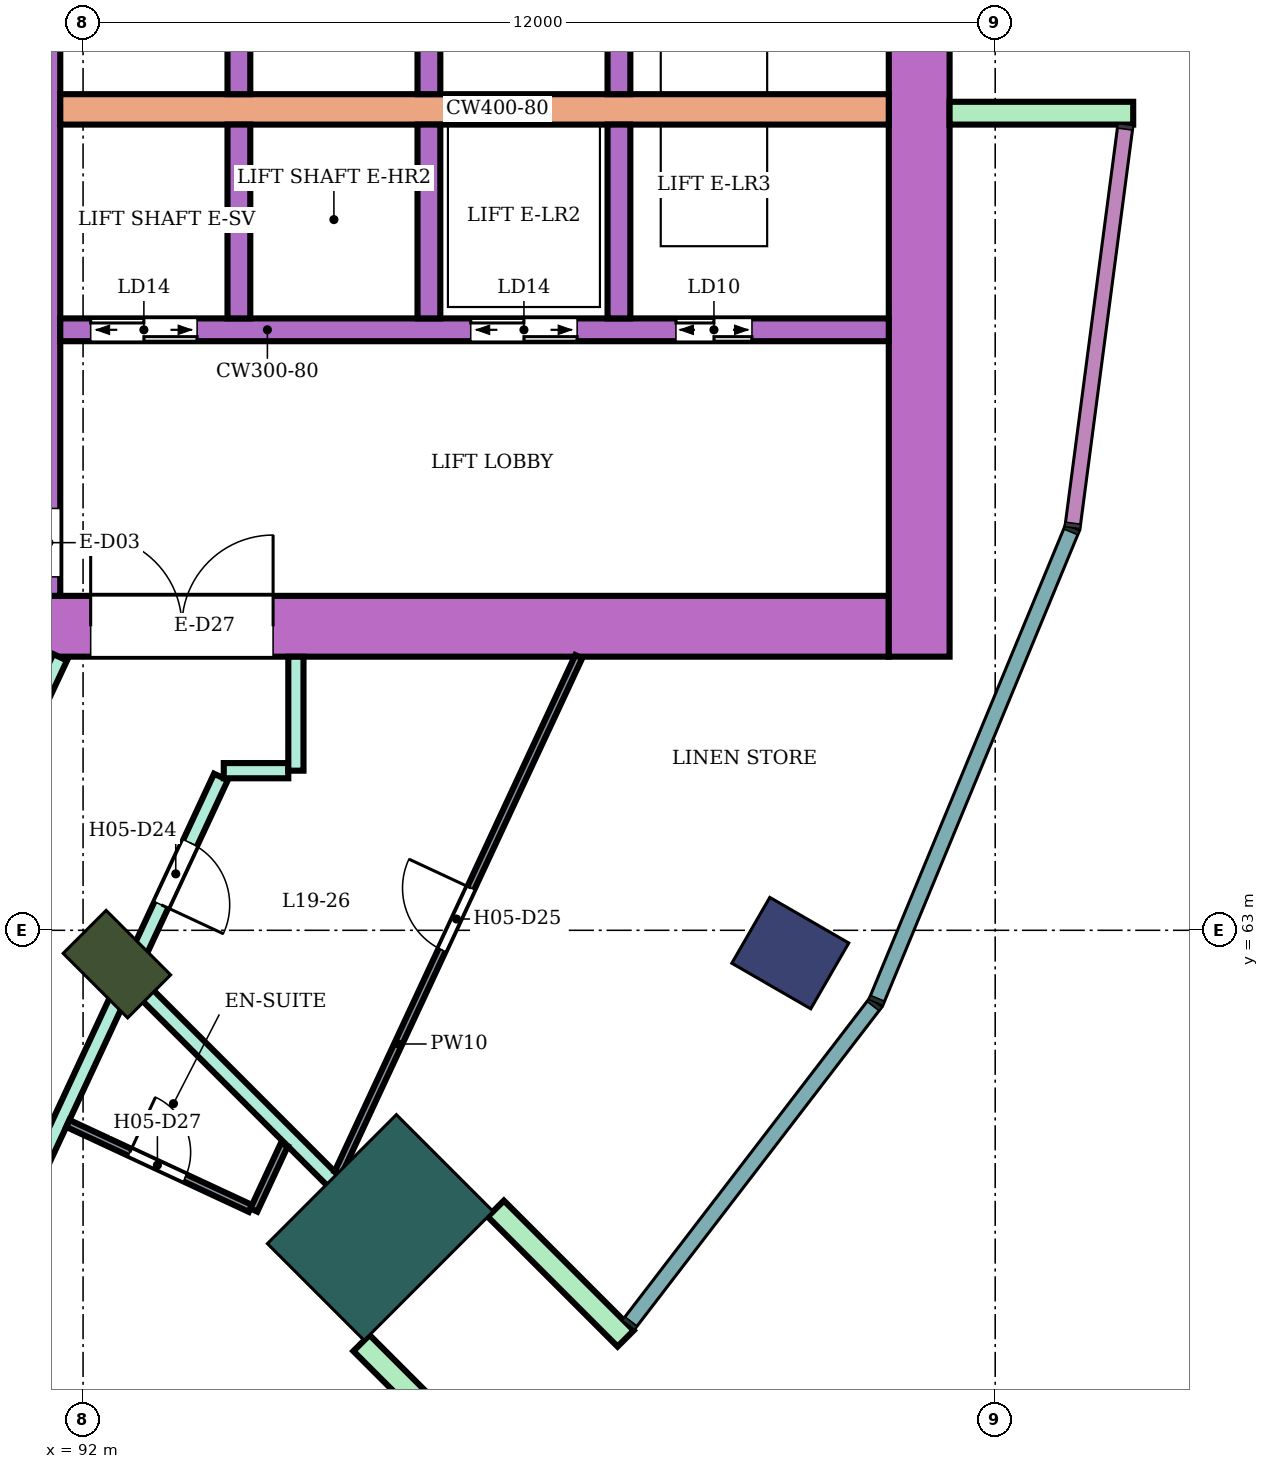
"""IFC4 building model, lengths in metres.
Left out: names, types, materials, properties, quantities, classifications, styles, units other than length and angle.
Written with IfcOpenShell. Run it as: python <this file> out.ifc"""

import sys

from ifc_helpers import new_model, si_unit, direction, frame, frame_2d, origin, origin_2d, place, context, subcontext, project, spatial, rectangle, extrude, element, fill, save


model = new_model("IFC4")
c1 = context("Model", 3, precision=1e-05, world=origin(), true_north=direction((0.0, 1.0)))
c2 = subcontext(c1, "Body", "Model", "MODEL_VIEW")
j1 = project(units=[si_unit("LENGTHUNIT", "METRE"), si_unit("PLANEANGLEUNIT", "RADIAN")], contexts=[c1])
p1 = place(None, origin())
s1 = spatial("IfcSite", under=j1, at=p1, CompositionType="ELEMENT")
p2 = place(p1, origin())
s2 = spatial("IfcBuilding", under=s1, at=p2, CompositionType="ELEMENT")
p3 = place(p2, frame((0.0, 0.0, 86.2)))
s3 = spatial("IfcBuildingStorey", under=s2, at=p3, CompositionType="ELEMENT", Elevation=86.2)
p4 = place(p3, frame((101.304, 62.7, 0.0), z_axis=(0.0, 0.0, 1.0), x_axis=(0.866025403784, -0.5, 0.0)))
e1 = element("IfcColumn", 1, at=p4, inside=s3, PredefinedType="COLUMN", context=c2, shape_type="SweptSolid", body=[
    extrude(rectangle(XDim=1.2, YDim=1.0, at=origin_2d()), origin(), (0.0, 0.0, 1.0), 3.8),
])
p5 = place(p3, frame((92.445, 62.555, 0.0), z_axis=(0.0, 0.0, 1.0), x_axis=(0.707106781187, -0.707106781187, 0.0)))
e2 = element("IfcColumn", 2, at=p5, inside=s3, PredefinedType="COLUMN", context=c2, shape_type="SweptSolid", body=[
    extrude(rectangle(XDim=1.2, YDim=0.8, at=origin_2d()), origin(), (0.0, 0.0, 1.0), 3.8),
])
p6 = place(p3, frame((95.91, 59.09, 0.0), z_axis=(0.0, 0.0, 1.0), x_axis=(0.707106781187, -0.707106781187, 0.0)))
e3 = element("IfcColumn", 3, at=p6, inside=s3, PredefinedType="COLUMN", context=c2, shape_type="SweptSolid", body=[
    extrude(rectangle(XDim=1.8, YDim=2.4, at=origin_2d()), origin(), (0.0, 0.0, 1.0), 3.8),
])
p7 = place(p3, frame((87.9, 67.0, 0.0), z_axis=(0.0, 0.0, 1.0), x_axis=(1.0, 0.0, 0.0)))
e4 = element("IfcWall", 4, at=p7, inside=s3, PredefinedType="SHEAR", context=c2, shape_type="SweptSolid", body=[
    extrude(rectangle(XDim=14.7, YDim=0.8, at=frame_2d((7.35, 0.0))), origin(), (0.0, 0.0, 1.0), 3.48),
])
p8 = place(p7, frame((4.2, 0.0, 0.0)))
e5 = element("IfcOpeningElement", 5, at=p8, cuts=e4, PredefinedType="OPENING", context=c2, shape_type="SweptSolid", body=[
    extrude(rectangle(XDim=2.4, YDim=2.4, at=frame_2d((1.2, 1.2))), frame((0.0, 0.41, 0.0), z_axis=(0.0, -1.0, 0.0), x_axis=(1.0, 0.0, 0.0)), (0.0, 0.0, 1.0), 0.82),
])
p9 = place(p3, frame((103.0, 66.6, 0.0), z_axis=(0.0, 0.0, 1.0), x_axis=(0.0, 1.0, 0.0)))
e6 = element("IfcWall", 6, at=p9, inside=s3, PredefinedType="SHEAR", context=c2, shape_type="SweptSolid", body=[
    extrude(rectangle(XDim=16.8, YDim=0.8, at=frame_2d((8.4, 0.0))), origin(), (0.0, 0.0, 1.0), 3.48),
])
p10 = place(p3, frame((91.55, 67.4, 0.0), z_axis=(0.0, 0.0, 1.0), x_axis=(0.0, 1.0, 0.0)))
e7 = element("IfcWall", 7, at=p10, inside=s3, PredefinedType="SHEAR", context=c2, shape_type="SweptSolid", body=[
    extrude(rectangle(XDim=7.6, YDim=0.3, at=frame_2d((3.8, 0.0))), origin(), (0.0, 0.0, 1.0), 3.48),
])
p11 = place(p10, frame((0.25, 0.0, 0.0)))
e8 = element("IfcOpeningElement", 8, at=p11, cuts=e7, PredefinedType="OPENING", context=c2, shape_type="SweptSolid", body=[
    extrude(rectangle(XDim=0.9, YDim=2.1, at=frame_2d((0.45, 1.05))), frame((0.0, 0.16, 0.0), z_axis=(0.0, -1.0, 0.0), x_axis=(1.0, 0.0, 0.0)), (0.0, 0.0, 1.0), 0.32),
])
p12 = place(p3, frame((91.7, 73.8, 0.0), z_axis=(0.0, 0.0, 1.0), x_axis=(1.0, 0.0, 0.0)))
e9 = element("IfcWall", 9, at=p12, inside=s3, PredefinedType="SHEAR", context=c2, shape_type="SweptSolid", body=[
    extrude(rectangle(XDim=10.9, YDim=0.4, at=frame_2d((5.45, 0.0))), origin(), (0.0, 0.0, 1.0), 3.48),
])
p13 = place(p3, frame((91.7, 70.9, 0.0), z_axis=(0.0, 0.0, 1.0), x_axis=(1.0, 0.0, 0.0)))
e10 = element("IfcWall", 10, at=p13, inside=s3, PredefinedType="SHEAR", context=c2, shape_type="SweptSolid", body=[
    extrude(rectangle(XDim=10.9, YDim=0.3, at=frame_2d((5.45, 0.0))), origin(), (0.0, 0.0, 1.0), 3.48),
])
p14 = place(p13, frame((0.4, 0.0, 0.0)))
e11 = element("IfcOpeningElement", 11, at=p14, cuts=e10, PredefinedType="OPENING", context=c2, shape_type="SweptSolid", body=[
    extrude(rectangle(XDim=1.4, YDim=2.1, at=frame_2d((0.7, 1.05))), frame((0.0, 0.16, 0.0), z_axis=(0.0, -1.0, 0.0), x_axis=(1.0, 0.0, 0.0)), (0.0, 0.0, 1.0), 0.32),
])
p15 = place(p13, frame((5.4, 0.0, 0.0)))
e12 = element("IfcOpeningElement", 12, at=p15, cuts=e10, PredefinedType="OPENING", context=c2, shape_type="SweptSolid", body=[
    extrude(rectangle(XDim=1.4, YDim=2.1, at=frame_2d((0.7, 1.05))), frame((0.0, 0.16, 0.0), z_axis=(0.0, -1.0, 0.0), x_axis=(1.0, 0.0, 0.0)), (0.0, 0.0, 1.0), 0.32),
])
p16 = place(p13, frame((8.1, 0.0, 0.0)))
e13 = element("IfcOpeningElement", 13, at=p16, cuts=e10, PredefinedType="OPENING", context=c2, shape_type="SweptSolid", body=[
    extrude(rectangle(XDim=1.0, YDim=2.1, at=frame_2d((0.5, 1.05))), frame((0.0, 0.16, 0.0), z_axis=(0.0, -1.0, 0.0), x_axis=(1.0, 0.0, 0.0)), (0.0, 0.0, 1.0), 0.32),
])
for number, where, z_axis, x_axis in (
    (14, (94.05, 74.0, 0.0), (0.0, 0.0, 1.0), (0.0, 1.0, 0.0)),
    (15, (96.55, 74.0, 0.0), (0.0, 0.0, 1.0), (0.0, 1.0, 0.0)),
    (16, (99.05, 74.0, 0.0), (0.0, 0.0, 1.0), (0.0, 1.0, 0.0)),
    (17, (94.05, 71.05, 0.0), (0.0, 0.0, 1.0), (0.0, 1.0, 0.0)),
    (18, (96.55, 71.05, 0.0), (0.0, 0.0, 1.0), (0.0, 1.0, 0.0)),
    (19, (99.05, 71.05, 0.0), (0.0, 0.0, 1.0), (0.0, 1.0, 0.0)),
):
    element("IfcWall", number, at=place(p3, frame(where, z_axis=z_axis, x_axis=x_axis)), inside=s3, PredefinedType="SHEAR", context=c2, shape_type="SweptSolid", body=[
        extrude(rectangle(XDim=2.55, YDim=0.3, at=frame_2d((1.275, 0.0))), origin(), (0.0, 0.0, 1.0), 3.48),
    ])
for number, where, z_axis, x_axis in (
    (20, (103.4, 73.75, 0.0), (0.0, 0.0, 1.0), (1.0, 0.0, 0.0)),
    (21, (95.662, 57.57, 0.0), (0.0, 0.0, 1.0), (0.707, -0.707, 0.0)),
    (22, (97.43, 59.338, 0.0), (0.0, 0.0, 1.0), (0.707, -0.707, 0.0)),
):
    element("IfcWall", number, at=place(p3, frame(where, z_axis=z_axis, x_axis=x_axis)), inside=s3, PredefinedType="NOTDEFINED", context=c2, shape_type="SweptSolid", body=[
        extrude(rectangle(XDim=2.416, YDim=0.3, at=frame_2d((1.208, 0.0))), origin(), (0.0, 0.0, 1.0), 3.8),
    ])
p17 = place(p3, frame((88.501, 59.775, 0.0), z_axis=(0.0, 0.0, 1.0), x_axis=(0.424700525505, 0.905333896215, 0.0)))
e23 = element("IfcWall", 23, at=p17, inside=s3, PredefinedType="PARTITIONING", context=c2, shape_type="SweptSolid", body=[
    extrude(rectangle(XDim=7.53, YDim=0.2, at=frame_2d((3.765, 0.0))), origin(), (0.0, 0.0, 1.0), 3.35),
])
p18 = place(p17, frame((5.83, 0.0, 0.0)))
e24 = element("IfcOpeningElement", 24, at=p18, cuts=e23, PredefinedType="OPENING", context=c2, shape_type="SweptSolid", body=[
    extrude(rectangle(XDim=1.0, YDim=2.1, at=frame_2d((0.5, 1.05))), frame((0.0, 0.11, 0.0), z_axis=(0.0, -1.0, 0.0), x_axis=(1.0, 0.0, 0.0)), (0.0, 0.0, 1.0), 0.22),
])
p19 = place(p3, frame((90.157, 57.394, 0.0), z_axis=(0.0, 0.0, 1.0), x_axis=(0.499815153866, -0.86613209845, 0.0)))
e25 = element("IfcWall", 25, at=p19, inside=s3, PredefinedType="PARTITIONING", context=c2, shape_type="SweptSolid", body=[
    extrude(rectangle(XDim=5.472, YDim=0.2, at=frame_2d((2.736, 0.0))), origin(), (0.0, 0.0, 1.0), 3.35),
])
p20 = place(p3, frame((90.346, 57.578, 0.0), z_axis=(0.0, 0.0, 1.0), x_axis=(0.422403412327, 0.906407941964, 0.0)))
e26 = element("IfcWall", 26, at=p20, inside=s3, PredefinedType="PARTITIONING", context=c2, shape_type="SweptSolid", body=[
    extrude(rectangle(XDim=8.208, YDim=0.2, at=frame_2d((4.104, 0.0))), origin(), (0.0, 0.0, 1.0), 3.35),
])
p21 = place(p20, frame((6.351, 0.0, 0.0)))
e27 = element("IfcOpeningElement", 27, at=p21, cuts=e26, PredefinedType="OPENING", context=c2, shape_type="SweptSolid", body=[
    extrude(rectangle(XDim=0.9, YDim=2.1, at=frame_2d((0.45, 1.05))), frame((0.0, 0.11, 0.0), z_axis=(0.0, -1.0, 0.0), x_axis=(1.0, 0.0, 0.0)), (0.0, 0.0, 1.0), 0.22),
])
p22 = place(p20, frame((0.55, 0.0, 0.0)))
e28 = element("IfcOpeningElement", 28, at=p22, cuts=e26, PredefinedType="OPENING", context=c2, shape_type="SweptSolid", body=[
    extrude(rectangle(XDim=1.0, YDim=2.1, at=frame_2d((0.5, 1.05))), frame((0.0, 0.11, 0.0), z_axis=(0.0, -1.0, 0.0), x_axis=(1.0, 0.0, 0.0)), (0.0, 0.0, 1.0), 0.22),
])
p23 = place(p3, frame((92.692, 62.303, 0.0), z_axis=(0.0, 0.0, 1.0), x_axis=(0.706920663731, -0.707292849667, 0.0)))
e29 = element("IfcWall", 29, at=p23, inside=s3, PredefinedType="PARTITIONING", context=c2, shape_type="SweptSolid", body=[
    extrude(rectangle(XDim=5.248, YDim=0.2, at=frame_2d((2.624, 0.0))), origin(), (0.0, 0.0, 1.0), 3.35),
])
p24 = place(p3, frame((93.851, 65.1, 0.0), z_axis=(0.0, 0.0, 1.0), x_axis=(1.0, 0.0, 0.0)))
e30 = element("IfcWall", 30, at=p24, inside=s3, PredefinedType="PARTITIONING", context=c2, shape_type="SweptSolid", body=[
    extrude(rectangle(XDim=0.849, YDim=0.2, at=frame_2d((0.424, 0.0))), origin(), (0.0, 0.0, 1.0), 3.35),
])
p25 = place(p3, frame((94.8, 65.1, 0.0), z_axis=(0.0, 0.0, 1.0), x_axis=(0.0, 1.0, 0.0)))
e31 = element("IfcWall", 31, at=p25, inside=s3, PredefinedType="PARTITIONING", context=c2, shape_type="SweptSolid", body=[
    extrude(rectangle(XDim=1.499, YDim=0.2, at=frame_2d((0.75, 0.0))), origin(), (0.0, 0.0, 1.0), 3.35),
])
p26 = place(p3, frame((91.8, 60.459, 0.0), z_axis=(0.0, 0.0, 1.0), x_axis=(0.906644059932, -0.421896371861, 0.0)))
e32 = element("IfcWall", 32, at=p26, inside=s3, PredefinedType="PARTITIONING", context=c2, shape_type="SweptSolid", body=[
    extrude(rectangle(XDim=2.649, YDim=0.1, at=frame_2d((1.325, 0.0))), origin(), (0.0, 0.0, 1.0), 3.35),
])
p27 = place(p26, frame((0.899, 0.0, 0.0)))
e33 = element("IfcOpeningElement", 33, at=p27, cuts=e32, PredefinedType="OPENING", context=c2, shape_type="SweptSolid", body=[
    extrude(rectangle(XDim=0.8, YDim=2.1, at=frame_2d((0.4, 1.05))), frame((0.0, 0.06, 0.0), z_axis=(0.0, -1.0, 0.0), x_axis=(1.0, 0.0, 0.0)), (0.0, 0.0, 1.0), 0.12),
])
p28 = place(p3, frame((94.247, 59.32, 0.0), z_axis=(0.0, 0.0, 1.0), x_axis=(0.422660124657, 0.906288264861, 0.0)))
e34 = element("IfcWall", 34, at=p28, inside=s3, PredefinedType="PARTITIONING", context=c2, shape_type="SweptSolid", body=[
    extrude(rectangle(XDim=0.949, YDim=0.1, at=frame_2d((0.475, 0.0))), origin(), (0.0, 0.0, 1.0), 3.35),
])
p29 = place(p3, frame((95.355, 59.806, 0.0), z_axis=(0.0, 0.0, 1.0), x_axis=(0.422407546544, 0.906406015328, 0.0)))
e35 = element("IfcWall", 35, at=p29, inside=s3, PredefinedType="PARTITIONING", context=c2, shape_type="SweptSolid", body=[
    extrude(rectangle(XDim=7.496, YDim=0.1, at=frame_2d((3.748, 0.0))), origin(), (0.0, 0.0, 1.0), 3.35),
])
p30 = place(p29, frame((3.238, 0.0, 0.0)))
e36 = element("IfcOpeningElement", 36, at=p30, cuts=e35, PredefinedType="OPENING", context=c2, shape_type="SweptSolid", body=[
    extrude(rectangle(XDim=0.9, YDim=2.1, at=frame_2d((0.45, 1.05))), frame((0.0, 0.06, 0.0), z_axis=(0.0, -1.0, 0.0), x_axis=(1.0, 0.0, 0.0)), (0.0, 0.0, 1.0), 0.12),
])
p31 = place(p21, frame((0.9, 0.0, 0.0), z_axis=(0.0, 0.0, 1.0), x_axis=(-1.0, 0.0, 0.0)))
e37 = element("IfcDoor", 37, at=p31, inside=s3, OperationType="SINGLE_SWING_RIGHT", PredefinedType="DOOR", context=c2, shape_type="SweptSolid", body=[
    extrude(rectangle(XDim=0.9, YDim=2.1, at=frame_2d((0.45, 1.05))), frame((0.0, 0.025, 0.0), z_axis=(0.0, -1.0, 0.0), x_axis=(1.0, 0.0, 0.0)), (0.0, 0.0, 1.0), 0.05),
])
fill(e27, e37)
p32 = place(p30, origin())
e38 = element("IfcDoor", 38, at=p32, inside=s3, OperationType="SINGLE_SWING_RIGHT", PredefinedType="DOOR", context=c2, shape_type="SweptSolid", body=[
    extrude(rectangle(XDim=0.9, YDim=2.1, at=frame_2d((0.45, 1.05))), frame((0.0, 0.025, 0.0), z_axis=(0.0, -1.0, 0.0), x_axis=(1.0, 0.0, 0.0)), (0.0, 0.0, 1.0), 0.05),
])
fill(e36, e38)
p33 = place(p27, origin())
e39 = element("IfcDoor", 39, at=p33, inside=s3, OperationType="SINGLE_SWING_LEFT", PredefinedType="DOOR", context=c2, shape_type="SweptSolid", body=[
    extrude(rectangle(XDim=0.8, YDim=2.1, at=frame_2d((0.4, 1.05))), frame((0.0, 0.025, 0.0), z_axis=(0.0, -1.0, 0.0), x_axis=(1.0, 0.0, 0.0)), (0.0, 0.0, 1.0), 0.05),
])
fill(e33, e39)
p34 = place(p14, origin())
e40 = element("IfcDoor", 40, at=p34, inside=s3, OperationType="DOUBLE_DOOR_SLIDING", PredefinedType="DOOR", context=c2, shape_type="SweptSolid", body=[
    extrude(rectangle(XDim=1.4, YDim=2.1, at=frame_2d((0.7, 1.05))), frame((0.0, 0.025, 0.0), z_axis=(0.0, -1.0, 0.0), x_axis=(1.0, 0.0, 0.0)), (0.0, 0.0, 1.0), 0.05),
])
fill(e11, e40)
p35 = place(p15, origin())
e41 = element("IfcDoor", 41, at=p35, inside=s3, OperationType="DOUBLE_DOOR_SLIDING", PredefinedType="DOOR", context=c2, shape_type="SweptSolid", body=[
    extrude(rectangle(XDim=1.4, YDim=2.1, at=frame_2d((0.7, 1.05))), frame((0.0, 0.025, 0.0), z_axis=(0.0, -1.0, 0.0), x_axis=(1.0, 0.0, 0.0)), (0.0, 0.0, 1.0), 0.05),
])
fill(e12, e41)
p36 = place(p16, origin())
e42 = element("IfcDoor", 42, at=p36, inside=s3, OperationType="DOUBLE_DOOR_SLIDING", PredefinedType="DOOR", context=c2, shape_type="SweptSolid", body=[
    extrude(rectangle(XDim=1.0, YDim=2.1, at=frame_2d((0.5, 1.05))), frame((0.0, 0.025, 0.0), z_axis=(0.0, -1.0, 0.0), x_axis=(1.0, 0.0, 0.0)), (0.0, 0.0, 1.0), 0.05),
])
fill(e13, e42)
p37 = place(p8, origin())
e43 = element("IfcDoor", 43, at=p37, inside=s3, OperationType="DOUBLE_DOOR_SINGLE_SWING", PredefinedType="DOOR", context=c2, shape_type="SweptSolid", body=[
    extrude(rectangle(XDim=2.4, YDim=2.4, at=frame_2d((1.2, 1.2))), frame((0.0, 0.025, 0.0), z_axis=(0.0, -1.0, 0.0), x_axis=(1.0, 0.0, 0.0)), (0.0, 0.0, 1.0), 0.05),
])
fill(e5, e43)
save(model, sys.argv[1])
